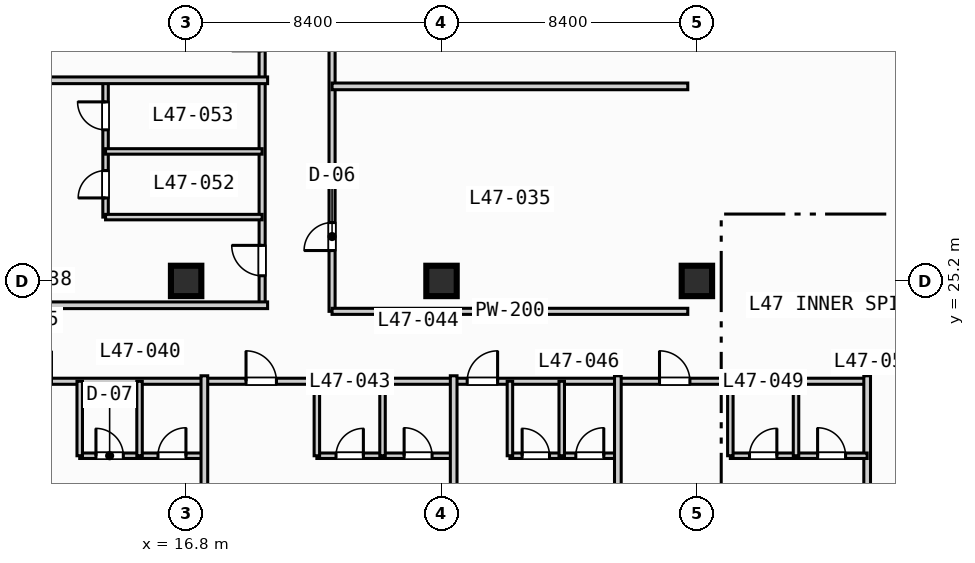
"""IFC4 building model, lengths in metres.
Left out: names, types, materials, properties, quantities, classifications, styles, units other than length and angle.
Written with IfcOpenShell. Run it as: python <this file> out.ifc"""

import sys

from ifc_helpers import new_model, si_unit, direction, frame, frame_2d, origin, origin_2d, place, context, subcontext, project, spatial, rectangle, extrude, element, fill, save


model = new_model("IFC4")
c1 = context("Model", 3, precision=1e-05, world=origin(), true_north=direction((0.0, 1.0)))
c2 = subcontext(c1, "Body", "Model", "MODEL_VIEW")
j1 = project(units=[si_unit("LENGTHUNIT", "METRE"), si_unit("PLANEANGLEUNIT", "RADIAN")], contexts=[c1])
p1 = place(None, origin())
s1 = spatial("IfcSite", under=j1, at=p1, CompositionType="ELEMENT")
p2 = place(p1, origin())
s2 = spatial("IfcBuilding", under=s1, at=p2, CompositionType="ELEMENT")
p3 = place(p2, frame((0.0, 0.0, 193.9)))
s3 = spatial("IfcBuildingStorey", under=s2, at=p3, CompositionType="ELEMENT", Elevation=193.9)
for number, where, z_axis, x_axis in (
    (1, (16.8, 25.2, 0.0), (0.0, 0.0, 1.0), (1.0, 0.0, 0.0)),
    (2, (25.2, 25.2, 0.0), (0.0, 0.0, 1.0), (1.0, 0.0, 0.0)),
    (3, (33.6, 25.2, 0.0), (0.0, 0.0, 1.0), (1.0, 0.0, 0.0)),
):
    element("IfcColumn", number, at=place(p3, frame(where, z_axis=z_axis, x_axis=x_axis)), inside=s3, PredefinedType="COLUMN", context=c2, shape_type="SweptSolid", body=[
        extrude(rectangle(XDim=1.0, YDim=1.0, at=origin_2d()), origin(), (0.0, 0.0, 1.0), 3.7),
    ])
p4 = place(p3, frame((21.6, 24.2, 0.0), z_axis=(0.0, 0.0, 1.0), x_axis=(0.0, 1.0, 0.0)))
e4 = element("IfcWall", 4, at=p4, inside=s3, PredefinedType="PARTITIONING", context=c2, shape_type="SweptSolid", body=[
    extrude(rectangle(XDim=15.0, YDim=0.2, at=frame_2d((7.5, 0.0))), origin(), (0.0, 0.0, 1.0), 3.47),
])
p5 = place(p4, frame((2.0, 0.0, 0.0)))
e5 = element("IfcOpeningElement", 5, at=p5, cuts=e4, PredefinedType="OPENING", context=c2, shape_type="SweptSolid", body=[
    extrude(rectangle(XDim=0.92, YDim=2.1, at=frame_2d((0.46, 1.05))), frame((0.0, 0.11, 0.0), z_axis=(0.0, -1.0, 0.0), x_axis=(1.0, 0.0, 0.0)), (0.0, 0.0, 1.0), 0.22),
])
p6 = place(p4, frame((9.4, 0.0, 0.0)))
e6 = element("IfcOpeningElement", 6, at=p6, cuts=e4, PredefinedType="OPENING", context=c2, shape_type="SweptSolid", body=[
    extrude(rectangle(XDim=0.92, YDim=2.1, at=frame_2d((0.46, 1.05))), frame((0.0, 0.11, 0.0), z_axis=(0.0, -1.0, 0.0), x_axis=(1.0, 0.0, 0.0)), (0.0, 0.0, 1.0), 0.22),
])
p7 = place(p3, frame((21.6, 24.2, 0.0), z_axis=(0.0, 0.0, 1.0), x_axis=(1.0, 0.0, 0.0)))
e7 = element("IfcWall", 7, at=p7, inside=s3, PredefinedType="PARTITIONING", context=c2, shape_type="SweptSolid", body=[
    extrude(rectangle(XDim=11.7, YDim=0.2, at=frame_2d((5.85, 0.0))), origin(), (0.0, 0.0, 1.0), 3.47),
])
p8 = place(p3, frame((21.6, 31.6, 0.0), z_axis=(0.0, 0.0, 1.0), x_axis=(1.0, 0.0, 0.0)))
e8 = element("IfcWall", 8, at=p8, inside=s3, PredefinedType="PARTITIONING", context=c2, shape_type="SweptSolid", body=[
    extrude(rectangle(XDim=11.7, YDim=0.22, at=frame_2d((5.85, 0.0))), origin(), (0.0, 0.0, 1.0), 3.47),
])
p9 = place(p3, frame((3.4, 21.9, 0.0), z_axis=(0.0, 0.0, 1.0), x_axis=(1.0, 0.0, 0.0)))
e9 = element("IfcWall", 9, at=p9, inside=s3, PredefinedType="PARTITIONING", context=c2, shape_type="SweptSolid", body=[
    extrude(rectangle(XDim=35.8, YDim=0.2, at=frame_2d((17.9, 0.0))), origin(), (0.0, 0.0, 1.0), 3.47),
])
p10 = place(p9, frame((0.97, 0.0, 0.0)))
e10 = element("IfcOpeningElement", 10, at=p10, cuts=e9, PredefinedType="OPENING", context=c2, shape_type="SweptSolid", body=[
    extrude(rectangle(XDim=1.0, YDim=2.15, at=frame_2d((0.5, 1.075))), frame((0.0, 0.11, 0.0), z_axis=(0.0, -1.0, 0.0), x_axis=(1.0, 0.0, 0.0)), (0.0, 0.0, 1.0), 0.22),
])
p11 = place(p9, frame((7.97, 0.0, 0.0)))
e11 = element("IfcOpeningElement", 11, at=p11, cuts=e9, PredefinedType="OPENING", context=c2, shape_type="SweptSolid", body=[
    extrude(rectangle(XDim=1.0, YDim=2.15, at=frame_2d((0.5, 1.075))), frame((0.0, 0.11, 0.0), z_axis=(0.0, -1.0, 0.0), x_axis=(1.0, 0.0, 0.0)), (0.0, 0.0, 1.0), 0.22),
])
p12 = place(p9, frame((15.37, 0.0, 0.0)))
e12 = element("IfcOpeningElement", 12, at=p12, cuts=e9, PredefinedType="OPENING", context=c2, shape_type="SweptSolid", body=[
    extrude(rectangle(XDim=1.0, YDim=2.15, at=frame_2d((0.5, 1.075))), frame((0.0, 0.11, 0.0), z_axis=(0.0, -1.0, 0.0), x_axis=(1.0, 0.0, 0.0)), (0.0, 0.0, 1.0), 0.22),
])
p13 = place(p9, frame((22.645, 0.0, 0.0)))
e13 = element("IfcOpeningElement", 13, at=p13, cuts=e9, PredefinedType="OPENING", context=c2, shape_type="SweptSolid", body=[
    extrude(rectangle(XDim=1.0, YDim=2.15, at=frame_2d((0.5, 1.075))), frame((0.0, 0.11, 0.0), z_axis=(0.0, -1.0, 0.0), x_axis=(1.0, 0.0, 0.0)), (0.0, 0.0, 1.0), 0.22),
])
p14 = place(p9, frame((28.97, 0.0, 0.0)))
e14 = element("IfcOpeningElement", 14, at=p14, cuts=e9, PredefinedType="OPENING", context=c2, shape_type="SweptSolid", body=[
    extrude(rectangle(XDim=1.0, YDim=2.15, at=frame_2d((0.5, 1.075))), frame((0.0, 0.11, 0.0), z_axis=(0.0, -1.0, 0.0), x_axis=(1.0, 0.0, 0.0)), (0.0, 0.0, 1.0), 0.22),
])
p15 = place(p3, frame((13.3, 19.45, 0.0), z_axis=(0.0, 0.0, 1.0), x_axis=(1.0, 0.0, 0.0)))
e15 = element("IfcWall", 15, at=p15, inside=s3, PredefinedType="PLUMBINGWALL", context=c2, shape_type="SweptSolid", body=[
    extrude(rectangle(XDim=4.1, YDim=0.18, at=frame_2d((2.05, 0.0))), origin(), (0.0, 0.0, 1.0), 3.47),
])
p16 = place(p15, frame((0.534, 0.0, 0.0)))
e16 = element("IfcOpeningElement", 16, at=p16, cuts=e15, PredefinedType="OPENING", context=c2, shape_type="SweptSolid", body=[
    extrude(rectangle(XDim=0.9, YDim=2.1, at=frame_2d((0.45, 1.05))), frame((0.0, 0.1, 0.0), z_axis=(0.0, -1.0, 0.0), x_axis=(1.0, 0.0, 0.0)), (0.0, 0.0, 1.0), 0.2),
])
p17 = place(p15, frame((2.574, 0.0, 0.0)))
e17 = element("IfcOpeningElement", 17, at=p17, cuts=e15, PredefinedType="OPENING", context=c2, shape_type="SweptSolid", body=[
    extrude(rectangle(XDim=0.92, YDim=2.1, at=frame_2d((0.46, 1.05))), frame((0.0, 0.1, 0.0), z_axis=(0.0, -1.0, 0.0), x_axis=(1.0, 0.0, 0.0)), (0.0, 0.0, 1.0), 0.2),
])
for number, where, z_axis, x_axis in (
    (18, (13.3, 19.45, 0.0), (0.0, 0.0, 1.0), (0.0, 1.0, 0.0)),
    (19, (15.268, 19.45, 0.0), (0.0, 0.0, 1.0), (0.0, 1.0, 0.0)),
):
    element("IfcWall", number, at=place(p3, frame(where, z_axis=z_axis, x_axis=x_axis)), inside=s3, PredefinedType="PLUMBINGWALL", context=c2, shape_type="SweptSolid", body=[
        extrude(rectangle(XDim=2.45, YDim=0.18, at=frame_2d((1.225, 0.0))), origin(), (0.0, 0.0, 1.0), 3.47),
    ])
p18 = place(p3, frame((17.4, 0.2, 0.0), z_axis=(0.0, 0.0, 1.0), x_axis=(0.0, 1.0, 0.0)))
e20 = element("IfcWall", 20, at=p18, inside=s3, PredefinedType="PARTITIONING", context=c2, shape_type="SweptSolid", body=[
    extrude(rectangle(XDim=21.88, YDim=0.22, at=frame_2d((10.94, 0.0))), origin(), (0.0, 0.0, 1.0), 3.47),
])
p19 = place(p3, frame((21.1, 19.45, 0.0), z_axis=(0.0, 0.0, 1.0), x_axis=(1.0, 0.0, 0.0)))
e21 = element("IfcWall", 21, at=p19, inside=s3, PredefinedType="PLUMBINGWALL", context=c2, shape_type="SweptSolid", body=[
    extrude(rectangle(XDim=4.5, YDim=0.18, at=frame_2d((2.25, 0.0))), origin(), (0.0, 0.0, 1.0), 3.47),
])
p20 = place(p19, frame((0.63, 0.0, 0.0)))
e22 = element("IfcOpeningElement", 22, at=p20, cuts=e21, PredefinedType="OPENING", context=c2, shape_type="SweptSolid", body=[
    extrude(rectangle(XDim=0.9, YDim=2.1, at=frame_2d((0.45, 1.05))), frame((0.0, 0.1, 0.0), z_axis=(0.0, -1.0, 0.0), x_axis=(1.0, 0.0, 0.0)), (0.0, 0.0, 1.0), 0.2),
])
p21 = place(p19, frame((2.87, 0.0, 0.0)))
e23 = element("IfcOpeningElement", 23, at=p21, cuts=e21, PredefinedType="OPENING", context=c2, shape_type="SweptSolid", body=[
    extrude(rectangle(XDim=0.92, YDim=2.1, at=frame_2d((0.46, 1.05))), frame((0.0, 0.1, 0.0), z_axis=(0.0, -1.0, 0.0), x_axis=(1.0, 0.0, 0.0)), (0.0, 0.0, 1.0), 0.2),
])
for number, where, z_axis, x_axis in (
    (24, (21.1, 19.45, 0.0), (0.0, 0.0, 1.0), (0.0, 1.0, 0.0)),
    (25, (23.26, 19.45, 0.0), (0.0, 0.0, 1.0), (0.0, 1.0, 0.0)),
):
    element("IfcWall", number, at=place(p3, frame(where, z_axis=z_axis, x_axis=x_axis)), inside=s3, PredefinedType="PLUMBINGWALL", context=c2, shape_type="SweptSolid", body=[
        extrude(rectangle(XDim=2.45, YDim=0.18, at=frame_2d((1.225, 0.0))), origin(), (0.0, 0.0, 1.0), 3.47),
    ])
p22 = place(p3, frame((25.6, 0.2, 0.0), z_axis=(0.0, 0.0, 1.0), x_axis=(0.0, 1.0, 0.0)))
e26 = element("IfcWall", 26, at=p22, inside=s3, PredefinedType="PARTITIONING", context=c2, shape_type="SweptSolid", body=[
    extrude(rectangle(XDim=21.88, YDim=0.22, at=frame_2d((10.94, 0.0))), origin(), (0.0, 0.0, 1.0), 3.47),
])
p23 = place(p3, frame((27.45, 19.45, 0.0), z_axis=(0.0, 0.0, 1.0), x_axis=(1.0, 0.0, 0.0)))
e27 = element("IfcWall", 27, at=p23, inside=s3, PredefinedType="PLUMBINGWALL", context=c2, shape_type="SweptSolid", body=[
    extrude(rectangle(XDim=3.55, YDim=0.18, at=frame_2d((1.775, 0.0))), origin(), (0.0, 0.0, 1.0), 3.47),
])
p24 = place(p23, frame((0.402, 0.0, 0.0)))
e28 = element("IfcOpeningElement", 28, at=p24, cuts=e27, PredefinedType="OPENING", context=c2, shape_type="SweptSolid", body=[
    extrude(rectangle(XDim=0.9, YDim=2.1, at=frame_2d((0.45, 1.05))), frame((0.0, 0.1, 0.0), z_axis=(0.0, -1.0, 0.0), x_axis=(1.0, 0.0, 0.0)), (0.0, 0.0, 1.0), 0.2),
])
p25 = place(p23, frame((2.167, 0.0, 0.0)))
e29 = element("IfcOpeningElement", 29, at=p25, cuts=e27, PredefinedType="OPENING", context=c2, shape_type="SweptSolid", body=[
    extrude(rectangle(XDim=0.92, YDim=2.1, at=frame_2d((0.46, 1.05))), frame((0.0, 0.1, 0.0), z_axis=(0.0, -1.0, 0.0), x_axis=(1.0, 0.0, 0.0)), (0.0, 0.0, 1.0), 0.2),
])
for number, where, z_axis, x_axis in (
    (30, (27.45, 19.45, 0.0), (0.0, 0.0, 1.0), (0.0, 1.0, 0.0)),
    (31, (29.154, 19.45, 0.0), (0.0, 0.0, 1.0), (0.0, 1.0, 0.0)),
):
    element("IfcWall", number, at=place(p3, frame(where, z_axis=z_axis, x_axis=x_axis)), inside=s3, PredefinedType="PLUMBINGWALL", context=c2, shape_type="SweptSolid", body=[
        extrude(rectangle(XDim=2.45, YDim=0.18, at=frame_2d((1.225, 0.0))), origin(), (0.0, 0.0, 1.0), 3.47),
    ])
for number, where, z_axis, x_axis in (
    (32, (31.0, 0.2, 0.0), (0.0, 0.0, 1.0), (0.0, 1.0, 0.0)),
    (33, (39.2, 0.2, 0.0), (0.0, 0.0, 1.0), (0.0, 1.0, 0.0)),
):
    element("IfcWall", number, at=place(p3, frame(where, z_axis=z_axis, x_axis=x_axis)), inside=s3, PredefinedType="PARTITIONING", context=c2, shape_type="SweptSolid", body=[
        extrude(rectangle(XDim=21.88, YDim=0.22, at=frame_2d((10.94, 0.0))), origin(), (0.0, 0.0, 1.0), 3.47),
    ])
p26 = place(p3, frame((34.7, 19.45, 0.0), z_axis=(0.0, 0.0, 1.0), x_axis=(1.0, 0.0, 0.0)))
e34 = element("IfcWall", 34, at=p26, inside=s3, PredefinedType="PLUMBINGWALL", context=c2, shape_type="SweptSolid", body=[
    extrude(rectangle(XDim=4.5, YDim=0.18, at=frame_2d((2.25, 0.0))), origin(), (0.0, 0.0, 1.0), 3.47),
])
p27 = place(p26, frame((0.63, 0.0, 0.0)))
e35 = element("IfcOpeningElement", 35, at=p27, cuts=e34, PredefinedType="OPENING", context=c2, shape_type="SweptSolid", body=[
    extrude(rectangle(XDim=0.9, YDim=2.1, at=frame_2d((0.45, 1.05))), frame((0.0, 0.1, 0.0), z_axis=(0.0, -1.0, 0.0), x_axis=(1.0, 0.0, 0.0)), (0.0, 0.0, 1.0), 0.2),
])
p28 = place(p26, frame((2.87, 0.0, 0.0)))
e36 = element("IfcOpeningElement", 36, at=p28, cuts=e34, PredefinedType="OPENING", context=c2, shape_type="SweptSolid", body=[
    extrude(rectangle(XDim=0.92, YDim=2.1, at=frame_2d((0.46, 1.05))), frame((0.0, 0.1, 0.0), z_axis=(0.0, -1.0, 0.0), x_axis=(1.0, 0.0, 0.0)), (0.0, 0.0, 1.0), 0.2),
])
for number, where, z_axis, x_axis in (
    (37, (34.7, 19.45, 0.0), (0.0, 0.0, 1.0), (0.0, 1.0, 0.0)),
    (38, (36.86, 19.45, 0.0), (0.0, 0.0, 1.0), (0.0, 1.0, 0.0)),
):
    element("IfcWall", number, at=place(p3, frame(where, z_axis=z_axis, x_axis=x_axis)), inside=s3, PredefinedType="PLUMBINGWALL", context=c2, shape_type="SweptSolid", body=[
        extrude(rectangle(XDim=2.45, YDim=0.18, at=frame_2d((1.225, 0.0))), origin(), (0.0, 0.0, 1.0), 3.47),
    ])
p29 = place(p3, frame((19.3, 24.4, 0.0), z_axis=(0.0, 0.0, 1.0), x_axis=(0.0, 1.0, 0.0)))
e39 = element("IfcWall", 39, at=p29, inside=s3, PredefinedType="PARTITIONING", context=c2, shape_type="SweptSolid", body=[
    extrude(rectangle(XDim=14.8, YDim=0.2, at=frame_2d((7.4, 0.0))), origin(), (0.0, 0.0, 1.0), 3.47),
])
p30 = place(p29, frame((0.97, 0.0, 0.0)))
e40 = element("IfcOpeningElement", 40, at=p30, cuts=e39, PredefinedType="OPENING", context=c2, shape_type="SweptSolid", body=[
    extrude(rectangle(XDim=1.0, YDim=2.15, at=frame_2d((0.5, 1.075))), frame((0.0, 0.11, 0.0), z_axis=(0.0, -1.0, 0.0), x_axis=(1.0, 0.0, 0.0)), (0.0, 0.0, 1.0), 0.22),
])
p31 = place(p29, frame((8.37, 0.0, 0.0)))
e41 = element("IfcOpeningElement", 41, at=p31, cuts=e39, PredefinedType="OPENING", context=c2, shape_type="SweptSolid", body=[
    extrude(rectangle(XDim=1.0, YDim=2.15, at=frame_2d((0.5, 1.075))), frame((0.0, 0.11, 0.0), z_axis=(0.0, -1.0, 0.0), x_axis=(1.0, 0.0, 0.0)), (0.0, 0.0, 1.0), 0.22),
])
p32 = place(p3, frame((0.2, 24.4, 0.0), z_axis=(0.0, 0.0, 1.0), x_axis=(1.0, 0.0, 0.0)))
e42 = element("IfcWall", 42, at=p32, inside=s3, PredefinedType="PARTITIONING", context=c2, shape_type="SweptSolid", body=[
    extrude(rectangle(XDim=19.28, YDim=0.22, at=frame_2d((9.64, 0.0))), origin(), (0.0, 0.0, 1.0), 3.47),
])
p33 = place(p3, frame((14.15, 27.3, 0.0), z_axis=(0.0, 0.0, 1.0), x_axis=(0.0, 1.0, 0.0)))
e43 = element("IfcWall", 43, at=p33, inside=s3, PredefinedType="PLUMBINGWALL", context=c2, shape_type="SweptSolid", body=[
    extrude(rectangle(XDim=4.5, YDim=0.18, at=frame_2d((2.25, 0.0))), origin(), (0.0, 0.0, 1.0), 3.47),
])
p34 = place(p33, frame((0.63, 0.0, 0.0)))
e44 = element("IfcOpeningElement", 44, at=p34, cuts=e43, PredefinedType="OPENING", context=c2, shape_type="SweptSolid", body=[
    extrude(rectangle(XDim=0.9, YDim=2.1, at=frame_2d((0.45, 1.05))), frame((0.0, 0.1, 0.0), z_axis=(0.0, -1.0, 0.0), x_axis=(1.0, 0.0, 0.0)), (0.0, 0.0, 1.0), 0.2),
])
p35 = place(p33, frame((2.87, 0.0, 0.0)))
e45 = element("IfcOpeningElement", 45, at=p35, cuts=e43, PredefinedType="OPENING", context=c2, shape_type="SweptSolid", body=[
    extrude(rectangle(XDim=0.92, YDim=2.1, at=frame_2d((0.46, 1.05))), frame((0.0, 0.1, 0.0), z_axis=(0.0, -1.0, 0.0), x_axis=(1.0, 0.0, 0.0)), (0.0, 0.0, 1.0), 0.2),
])
for number, where, z_axis, x_axis in (
    (46, (14.15, 27.3, 0.0), (0.0, 0.0, 1.0), (1.0, 0.0, 0.0)),
    (47, (14.15, 29.46, 0.0), (0.0, 0.0, 1.0), (1.0, 0.0, 0.0)),
):
    element("IfcWall", number, at=place(p3, frame(where, z_axis=z_axis, x_axis=x_axis)), inside=s3, PredefinedType="PLUMBINGWALL", context=c2, shape_type="SweptSolid", body=[
        extrude(rectangle(XDim=5.15, YDim=0.18, at=frame_2d((2.575, 0.0))), origin(), (0.0, 0.0, 1.0), 3.47),
    ])
p36 = place(p3, frame((0.2, 31.8, 0.0), z_axis=(0.0, 0.0, 1.0), x_axis=(1.0, 0.0, 0.0)))
e48 = element("IfcWall", 48, at=p36, inside=s3, PredefinedType="PARTITIONING", context=c2, shape_type="SweptSolid", body=[
    extrude(rectangle(XDim=19.28, YDim=0.22, at=frame_2d((9.64, 0.0))), origin(), (0.0, 0.0, 1.0), 3.47),
])
p37 = place(p5, origin())
e49 = element("IfcDoor", 49, at=p37, inside=s3, OperationType="SINGLE_SWING_LEFT", PredefinedType="DOOR", context=c2, shape_type="SweptSolid", body=[
    extrude(rectangle(XDim=0.92, YDim=2.1, at=frame_2d((0.46, 1.05))), frame((0.0, 0.025, 0.0), z_axis=(0.0, -1.0, 0.0), x_axis=(1.0, 0.0, 0.0)), (0.0, 0.0, 1.0), 0.05),
])
fill(e5, e49)
p38 = place(p12, origin())
e50 = element("IfcDoor", 50, at=p38, inside=s3, OperationType="SINGLE_SWING_LEFT", PredefinedType="DOOR", context=c2, shape_type="SweptSolid", body=[
    extrude(rectangle(XDim=1.0, YDim=2.15, at=frame_2d((0.5, 1.075))), frame((0.0, 0.025, 0.0), z_axis=(0.0, -1.0, 0.0), x_axis=(1.0, 0.0, 0.0)), (0.0, 0.0, 1.0), 0.05),
])
fill(e12, e50)
p39 = place(p13, origin())
e51 = element("IfcDoor", 51, at=p39, inside=s3, OperationType="SINGLE_SWING_RIGHT", PredefinedType="DOOR", context=c2, shape_type="SweptSolid", body=[
    extrude(rectangle(XDim=1.0, YDim=2.15, at=frame_2d((0.5, 1.075))), frame((0.0, 0.025, 0.0), z_axis=(0.0, -1.0, 0.0), x_axis=(1.0, 0.0, 0.0)), (0.0, 0.0, 1.0), 0.05),
])
fill(e13, e51)
p40 = place(p14, origin())
e52 = element("IfcDoor", 52, at=p40, inside=s3, OperationType="SINGLE_SWING_LEFT", PredefinedType="DOOR", context=c2, shape_type="SweptSolid", body=[
    extrude(rectangle(XDim=1.0, YDim=2.15, at=frame_2d((0.5, 1.075))), frame((0.0, 0.025, 0.0), z_axis=(0.0, -1.0, 0.0), x_axis=(1.0, 0.0, 0.0)), (0.0, 0.0, 1.0), 0.05),
])
fill(e14, e52)
p41 = place(p16, origin())
e53 = element("IfcDoor", 53, at=p41, inside=s3, OperationType="SINGLE_SWING_LEFT", PredefinedType="DOOR", context=c2, shape_type="SweptSolid", body=[
    extrude(rectangle(XDim=0.9, YDim=2.1, at=frame_2d((0.45, 1.05))), frame((0.0, 0.025, 0.0), z_axis=(0.0, -1.0, 0.0), x_axis=(1.0, 0.0, 0.0)), (0.0, 0.0, 1.0), 0.05),
])
fill(e16, e53)
p42 = place(p17, origin())
e54 = element("IfcDoor", 54, at=p42, inside=s3, OperationType="SINGLE_SWING_RIGHT", PredefinedType="DOOR", context=c2, shape_type="SweptSolid", body=[
    extrude(rectangle(XDim=0.92, YDim=2.1, at=frame_2d((0.46, 1.05))), frame((0.0, 0.025, 0.0), z_axis=(0.0, -1.0, 0.0), x_axis=(1.0, 0.0, 0.0)), (0.0, 0.0, 1.0), 0.05),
])
fill(e17, e54)
p43 = place(p20, origin())
e55 = element("IfcDoor", 55, at=p43, inside=s3, OperationType="SINGLE_SWING_RIGHT", PredefinedType="DOOR", context=c2, shape_type="SweptSolid", body=[
    extrude(rectangle(XDim=0.9, YDim=2.1, at=frame_2d((0.45, 1.05))), frame((0.0, 0.025, 0.0), z_axis=(0.0, -1.0, 0.0), x_axis=(1.0, 0.0, 0.0)), (0.0, 0.0, 1.0), 0.05),
])
fill(e22, e55)
p44 = place(p21, origin())
e56 = element("IfcDoor", 56, at=p44, inside=s3, OperationType="SINGLE_SWING_LEFT", PredefinedType="DOOR", context=c2, shape_type="SweptSolid", body=[
    extrude(rectangle(XDim=0.92, YDim=2.1, at=frame_2d((0.46, 1.05))), frame((0.0, 0.025, 0.0), z_axis=(0.0, -1.0, 0.0), x_axis=(1.0, 0.0, 0.0)), (0.0, 0.0, 1.0), 0.05),
])
fill(e23, e56)
p45 = place(p24, origin())
e57 = element("IfcDoor", 57, at=p45, inside=s3, OperationType="SINGLE_SWING_LEFT", PredefinedType="DOOR", context=c2, shape_type="SweptSolid", body=[
    extrude(rectangle(XDim=0.9, YDim=2.1, at=frame_2d((0.45, 1.05))), frame((0.0, 0.025, 0.0), z_axis=(0.0, -1.0, 0.0), x_axis=(1.0, 0.0, 0.0)), (0.0, 0.0, 1.0), 0.05),
])
fill(e28, e57)
p46 = place(p25, origin())
e58 = element("IfcDoor", 58, at=p46, inside=s3, OperationType="SINGLE_SWING_RIGHT", PredefinedType="DOOR", context=c2, shape_type="SweptSolid", body=[
    extrude(rectangle(XDim=0.92, YDim=2.1, at=frame_2d((0.46, 1.05))), frame((0.0, 0.025, 0.0), z_axis=(0.0, -1.0, 0.0), x_axis=(1.0, 0.0, 0.0)), (0.0, 0.0, 1.0), 0.05),
])
fill(e29, e58)
p47 = place(p27, origin())
e59 = element("IfcDoor", 59, at=p47, inside=s3, OperationType="SINGLE_SWING_RIGHT", PredefinedType="DOOR", context=c2, shape_type="SweptSolid", body=[
    extrude(rectangle(XDim=0.9, YDim=2.1, at=frame_2d((0.45, 1.05))), frame((0.0, 0.025, 0.0), z_axis=(0.0, -1.0, 0.0), x_axis=(1.0, 0.0, 0.0)), (0.0, 0.0, 1.0), 0.05),
])
fill(e35, e59)
p48 = place(p28, origin())
e60 = element("IfcDoor", 60, at=p48, inside=s3, OperationType="SINGLE_SWING_LEFT", PredefinedType="DOOR", context=c2, shape_type="SweptSolid", body=[
    extrude(rectangle(XDim=0.92, YDim=2.1, at=frame_2d((0.46, 1.05))), frame((0.0, 0.025, 0.0), z_axis=(0.0, -1.0, 0.0), x_axis=(1.0, 0.0, 0.0)), (0.0, 0.0, 1.0), 0.05),
])
fill(e36, e60)
p49 = place(p30, origin())
e61 = element("IfcDoor", 61, at=p49, inside=s3, OperationType="SINGLE_SWING_RIGHT", PredefinedType="DOOR", context=c2, shape_type="SweptSolid", body=[
    extrude(rectangle(XDim=1.0, YDim=2.15, at=frame_2d((0.5, 1.075))), frame((0.0, 0.025, 0.0), z_axis=(0.0, -1.0, 0.0), x_axis=(1.0, 0.0, 0.0)), (0.0, 0.0, 1.0), 0.05),
])
fill(e40, e61)
p50 = place(p34, origin())
e62 = element("IfcDoor", 62, at=p50, inside=s3, OperationType="SINGLE_SWING_LEFT", PredefinedType="DOOR", context=c2, shape_type="SweptSolid", body=[
    extrude(rectangle(XDim=0.9, YDim=2.1, at=frame_2d((0.45, 1.05))), frame((0.0, 0.025, 0.0), z_axis=(0.0, -1.0, 0.0), x_axis=(1.0, 0.0, 0.0)), (0.0, 0.0, 1.0), 0.05),
])
fill(e44, e62)
p51 = place(p35, origin())
e63 = element("IfcDoor", 63, at=p51, inside=s3, OperationType="SINGLE_SWING_RIGHT", PredefinedType="DOOR", context=c2, shape_type="SweptSolid", body=[
    extrude(rectangle(XDim=0.92, YDim=2.1, at=frame_2d((0.46, 1.05))), frame((0.0, 0.025, 0.0), z_axis=(0.0, -1.0, 0.0), x_axis=(1.0, 0.0, 0.0)), (0.0, 0.0, 1.0), 0.05),
])
fill(e45, e63)
save(model, sys.argv[1])
